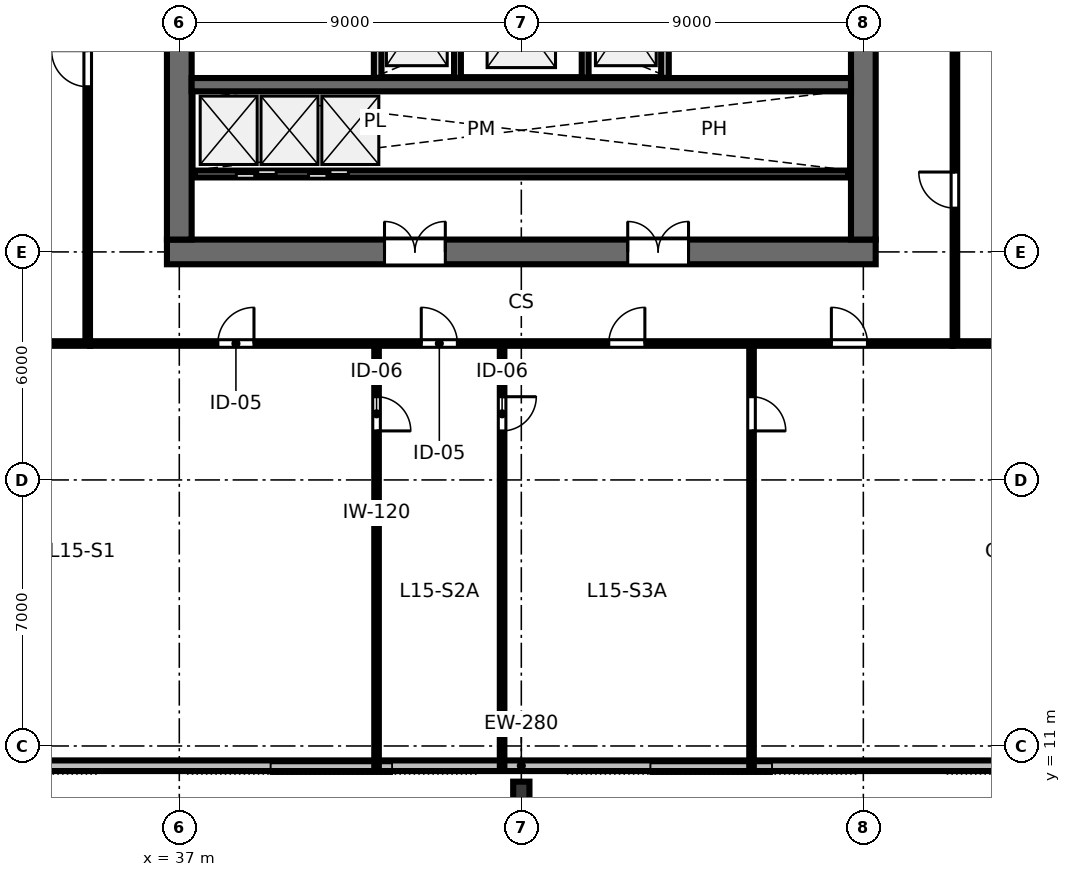
"""IFC4 building model, lengths in metres.
Left out: names, types, materials, properties, quantities, classifications, styles, units other than length and angle.
Written with IfcOpenShell. Run it as: python <this file> out.ifc"""

import sys

from ifc_helpers import new_model, si_unit, direction, frame, frame_2d, origin, origin_2d, place, context, subcontext, project, spatial, rectangle, i_section, extrude, element, fill, save


model = new_model("IFC4")
c1 = context("Model", 3, precision=1e-05, world=origin(), true_north=direction((0.0, 1.0)))
c2 = subcontext(c1, "Body", "Model", "MODEL_VIEW")
j1 = project(units=[si_unit("LENGTHUNIT", "METRE"), si_unit("PLANEANGLEUNIT", "RADIAN")], contexts=[c1])
p1 = place(None, origin())
s1 = spatial("IfcSite", under=j1, at=p1, CompositionType="ELEMENT")
p2 = place(p1, origin())
s2 = spatial("IfcBuilding", under=s1, at=p2, CompositionType="ELEMENT")
p3 = place(p2, frame((0.0, 0.0, 60.4)))
s3 = spatial("IfcBuildingStorey", under=s2, at=p3, CompositionType="ELEMENT", Elevation=60.4)
p4 = place(p3, frame((36.675, 24.0, 0.0), z_axis=(0.0, 0.0, 1.0), x_axis=(1.0, 0.0, 0.0)))
e1 = element("IfcWall", 1, at=p4, inside=s3, PredefinedType="SHEAR", context=c2, shape_type="SweptSolid", body=[
    extrude(rectangle(XDim=18.65, YDim=0.65, at=frame_2d((9.325, 0.0))), origin(), (0.0, 0.0, 1.0), 3.36),
])
p5 = place(p4, frame((5.725, 0.0, 0.0)))
e2 = element("IfcOpeningElement", 2, at=p5, cuts=e1, PredefinedType="OPENING", context=c2, shape_type="SweptSolid", body=[
    extrude(rectangle(XDim=1.6, YDim=2.15, at=frame_2d((0.8, 1.075))), frame((0.0, 0.335, 0.0), z_axis=(0.0, -1.0, 0.0), x_axis=(1.0, 0.0, 0.0)), (0.0, 0.0, 1.0), 0.67),
])
p6 = place(p4, frame((12.125, 0.0, 0.0)))
e3 = element("IfcOpeningElement", 3, at=p6, cuts=e1, PredefinedType="OPENING", context=c2, shape_type="SweptSolid", body=[
    extrude(rectangle(XDim=1.6, YDim=2.15, at=frame_2d((0.8, 1.075))), frame((0.0, 0.335, 0.0), z_axis=(0.0, -1.0, 0.0), x_axis=(1.0, 0.0, 0.0)), (0.0, 0.0, 1.0), 0.67),
])
p7 = place(p3, frame((37.0, 24.325, 0.0), z_axis=(0.0, 0.0, 1.0), x_axis=(0.0, 1.0, 0.0)))
e4 = element("IfcWall", 4, at=p7, inside=s3, PredefinedType="SHEAR", context=c2, shape_type="SweptSolid", body=[
    extrude(rectangle(XDim=15.35, YDim=0.65, at=frame_2d((7.675, 0.0))), origin(), (0.0, 0.0, 1.0), 3.36),
])
p8 = place(p7, frame((5.2, 0.0, 0.0)))
e5 = element("IfcOpeningElement", 5, at=p8, cuts=e4, PredefinedType="OPENING", context=c2, shape_type="SweptSolid", body=[
    extrude(rectangle(XDim=1.15, YDim=2.15, at=frame_2d((0.575, 1.075))), frame((0.0, 0.335, 0.0), z_axis=(0.0, -1.0, 0.0), x_axis=(1.0, 0.0, 0.0)), (0.0, 0.0, 1.0), 0.67),
])
p9 = place(p3, frame((55.0, 24.325, 0.0), z_axis=(0.0, 0.0, 1.0), x_axis=(0.0, 1.0, 0.0)))
e6 = element("IfcWall", 6, at=p9, inside=s3, PredefinedType="SHEAR", context=c2, shape_type="SweptSolid", body=[
    extrude(rectangle(XDim=15.35, YDim=0.65, at=frame_2d((7.675, 0.0))), origin(), (0.0, 0.0, 1.0), 3.36),
])
p10 = place(p9, frame((5.2, 0.0, 0.0)))
e7 = element("IfcOpeningElement", 7, at=p10, cuts=e6, PredefinedType="OPENING", context=c2, shape_type="SweptSolid", body=[
    extrude(rectangle(XDim=1.15, YDim=2.15, at=frame_2d((0.575, 1.075))), frame((0.0, 0.335, 0.0), z_axis=(0.0, -1.0, 0.0), x_axis=(1.0, 0.0, 0.0)), (0.0, 0.0, 1.0), 0.67),
])
p11 = place(p3, frame((37.325, 28.4, 0.0), z_axis=(0.0, 0.0, 1.0), x_axis=(1.0, 0.0, 0.0)))
e8 = element("IfcWall", 8, at=p11, inside=s3, PredefinedType="SHEAR", context=c2, shape_type="SweptSolid", body=[
    extrude(rectangle(XDim=17.35, YDim=0.35, at=frame_2d((8.675, 0.0))), origin(), (0.0, 0.0, 1.0), 3.36),
])
p12 = place(p3, frame((46.0, 9.82, 0.0), z_axis=(0.0, 0.0, 1.0), x_axis=(1.0, 0.0, 0.0)))
e9 = element("IfcColumn", 9, at=p12, inside=s3, PredefinedType="COLUMN", context=c2, shape_type="SweptSolid", body=[
    extrude(i_section(OverallWidth=0.428, OverallDepth=0.483, WebThickness=0.051, FlangeThickness=0.082, FilletRadius=0.025, at=origin_2d()), origin(), (0.0, 0.0, 1.0), 3.358),
])
p13 = place(p3, frame((25.11, 10.48, 0.0), z_axis=(0.0, 0.0, 1.0), x_axis=(1.0, 0.0, 0.0)))
e10 = element("IfcWall", 10, at=p13, inside=s3, PredefinedType="STANDARD", context=c2, shape_type="SweptSolid", body=[
    extrude(rectangle(XDim=41.78, YDim=0.28, at=frame_2d((20.89, 0.0))), origin(), (0.0, 0.0, 1.0), 3.36),
])
p14 = place(p3, frame((42.22, 28.58, 0.0), z_axis=(0.0, 0.0, 1.0), x_axis=(0.0, 1.0, 0.0)))
e11 = element("IfcWall", 11, at=p14, inside=s3, PredefinedType="PARTITIONING", context=c2, shape_type="SweptSolid", body=[
    extrude(rectangle(XDim=3.04, YDim=0.2, at=frame_2d((1.52, 0.0))), origin(), (0.0, 0.0, 1.0), 3.36),
])
p15 = place(p14, frame((0.95, 0.0, 0.0)))
e12 = element("IfcOpeningElement", 12, at=p15, cuts=e11, PredefinedType="OPENING", context=c2, shape_type="SweptSolid", body=[
    extrude(rectangle(XDim=1.05, YDim=2.15, at=frame_2d((0.525, 1.075))), frame((0.0, 0.11, 0.0), z_axis=(0.0, -1.0, 0.0), x_axis=(1.0, 0.0, 0.0)), (0.0, 0.0, 1.0), 0.22),
])
p16 = place(p3, frame((49.78, 28.58, 0.0), z_axis=(0.0, 0.0, 1.0), x_axis=(0.0, 1.0, 0.0)))
e13 = element("IfcWall", 13, at=p16, inside=s3, PredefinedType="PARTITIONING", context=c2, shape_type="SweptSolid", body=[
    extrude(rectangle(XDim=3.04, YDim=0.2, at=frame_2d((1.52, 0.0))), origin(), (0.0, 0.0, 1.0), 3.36),
])
p17 = place(p16, frame((0.95, 0.0, 0.0)))
e14 = element("IfcOpeningElement", 14, at=p17, cuts=e13, PredefinedType="OPENING", context=c2, shape_type="SweptSolid", body=[
    extrude(rectangle(XDim=1.05, YDim=2.15, at=frame_2d((0.525, 1.075))), frame((0.0, 0.11, 0.0), z_axis=(0.0, -1.0, 0.0), x_axis=(1.0, 0.0, 0.0)), (0.0, 0.0, 1.0), 0.22),
])
for number, where, z_axis, x_axis in (
    (15, (44.32, 28.58, 0.0), (0.0, 0.0, 1.0), (0.0, 1.0, 0.0)),
    (16, (47.68, 28.58, 0.0), (0.0, 0.0, 1.0), (0.0, 1.0, 0.0)),
):
    element("IfcWall", number, at=place(p3, frame(where, z_axis=z_axis, x_axis=x_axis)), inside=s3, PredefinedType="PARTITIONING", context=c2, shape_type="SweptSolid", body=[
        extrude(rectangle(XDim=3.04, YDim=0.18, at=frame_2d((1.52, 0.0))), origin(), (0.0, 0.0, 1.0), 3.36),
    ])
p18 = place(p3, frame((37.4, 26.05, 0.0), z_axis=(0.0, 0.0, 1.0), x_axis=(1.0, 0.0, 0.0)))
e17 = element("IfcWall", 17, at=p18, inside=s3, PredefinedType="PARTITIONING", context=c2, shape_type="SweptSolid", body=[
    extrude(rectangle(XDim=17.2, YDim=0.18, at=frame_2d((8.6, 0.0))), origin(), (0.0, 0.0, 1.0), 3.36),
])
p19 = place(p18, frame((1.1, 0.0, 0.0)))
e18 = element("IfcOpeningElement", 18, at=p19, cuts=e17, PredefinedType="OPENING", context=c2, shape_type="SweptSolid", body=[
    extrude(rectangle(XDim=1.05, YDim=2.15, at=frame_2d((0.525, 1.075))), frame((0.0, 0.1, 0.0), z_axis=(0.0, -1.0, 0.0), x_axis=(1.0, 0.0, 0.0)), (0.0, 0.0, 1.0), 0.2),
])
p20 = place(p18, frame((3.0, 0.0, 0.0)))
e19 = element("IfcOpeningElement", 19, at=p20, cuts=e17, PredefinedType="OPENING", context=c2, shape_type="SweptSolid", body=[
    extrude(rectangle(XDim=1.05, YDim=2.15, at=frame_2d((0.525, 1.075))), frame((0.0, 0.1, 0.0), z_axis=(0.0, -1.0, 0.0), x_axis=(1.0, 0.0, 0.0)), (0.0, 0.0, 1.0), 0.2),
])
p21 = place(p3, frame((42.191, 21.59, 0.0), z_axis=(0.0, 0.0, 1.0), x_axis=(0.0, -1.0, 0.0)))
e20 = element("IfcWall", 20, at=p21, inside=s3, PredefinedType="PARTITIONING", context=c2, shape_type="SweptSolid", body=[
    extrude(rectangle(XDim=11.11, YDim=0.12, at=frame_2d((5.555, 0.0))), origin(), (0.0, 0.0, 1.0), 2.64),
])
p22 = place(p21, frame((1.4, 0.0, 0.0)))
e21 = element("IfcOpeningElement", 21, at=p22, cuts=e20, PredefinedType="OPENING", context=c2, shape_type="SweptSolid", body=[
    extrude(rectangle(XDim=0.9, YDim=2.15, at=frame_2d((0.45, 1.075))), frame((0.0, 0.07, 0.0), z_axis=(0.0, -1.0, 0.0), x_axis=(1.0, 0.0, 0.0)), (0.0, 0.0, 1.0), 0.14),
])
p23 = place(p3, frame((45.494, 21.59, 0.0), z_axis=(0.0, 0.0, 1.0), x_axis=(0.0, -1.0, 0.0)))
e22 = element("IfcWall", 22, at=p23, inside=s3, PredefinedType="PARTITIONING", context=c2, shape_type="SweptSolid", body=[
    extrude(rectangle(XDim=11.11, YDim=0.12, at=frame_2d((5.555, 0.0))), origin(), (0.0, 0.0, 1.0), 2.64),
])
p24 = place(p23, frame((1.4, 0.0, 0.0)))
e23 = element("IfcOpeningElement", 23, at=p24, cuts=e22, PredefinedType="OPENING", context=c2, shape_type="SweptSolid", body=[
    extrude(rectangle(XDim=0.9, YDim=2.15, at=frame_2d((0.45, 1.075))), frame((0.0, 0.07, 0.0), z_axis=(0.0, -1.0, 0.0), x_axis=(1.0, 0.0, 0.0)), (0.0, 0.0, 1.0), 0.14),
])
p25 = place(p3, frame((52.058, 21.59, 0.0), z_axis=(0.0, 0.0, 1.0), x_axis=(0.0, -1.0, 0.0)))
e24 = element("IfcWall", 24, at=p25, inside=s3, PredefinedType="PARTITIONING", context=c2, shape_type="SweptSolid", body=[
    extrude(rectangle(XDim=11.11, YDim=0.12, at=frame_2d((5.555, 0.0))), origin(), (0.0, 0.0, 1.0), 2.64),
])
p26 = place(p25, frame((1.4, 0.0, 0.0)))
e25 = element("IfcOpeningElement", 25, at=p26, cuts=e24, PredefinedType="OPENING", context=c2, shape_type="SweptSolid", body=[
    extrude(rectangle(XDim=0.9, YDim=2.15, at=frame_2d((0.45, 1.075))), frame((0.0, 0.07, 0.0), z_axis=(0.0, -1.0, 0.0), x_axis=(1.0, 0.0, 0.0)), (0.0, 0.0, 1.0), 0.14),
])
p27 = place(p3, frame((34.65, 21.59, 0.0), z_axis=(0.0, 0.0, 1.0), x_axis=(1.0, 0.0, 0.0)))
e26 = element("IfcWall", 26, at=p27, inside=s3, PredefinedType="PARTITIONING", context=c2, shape_type="SweptSolid", body=[
    extrude(rectangle(XDim=22.7, YDim=0.12, at=frame_2d((11.35, 0.0))), origin(), (0.0, 0.0, 1.0), 2.64),
])
p28 = place(p27, frame((3.365, 0.0, 0.0)))
e27 = element("IfcOpeningElement", 27, at=p28, cuts=e26, PredefinedType="OPENING", context=c2, shape_type="SweptSolid", body=[
    extrude(rectangle(XDim=0.95, YDim=2.15, at=frame_2d((0.475, 1.075))), frame((0.0, 0.07, 0.0), z_axis=(0.0, -1.0, 0.0), x_axis=(1.0, 0.0, 0.0)), (0.0, 0.0, 1.0), 0.14),
])
p29 = place(p27, frame((8.718, 0.0, 0.0)))
e28 = element("IfcOpeningElement", 28, at=p29, cuts=e26, PredefinedType="OPENING", context=c2, shape_type="SweptSolid", body=[
    extrude(rectangle(XDim=0.95, YDim=2.15, at=frame_2d((0.475, 1.075))), frame((0.0, 0.07, 0.0), z_axis=(0.0, -1.0, 0.0), x_axis=(1.0, 0.0, 0.0)), (0.0, 0.0, 1.0), 0.14),
])
p30 = place(p27, frame((13.651, 0.0, 0.0)))
e29 = element("IfcOpeningElement", 29, at=p30, cuts=e26, PredefinedType="OPENING", context=c2, shape_type="SweptSolid", body=[
    extrude(rectangle(XDim=0.95, YDim=2.15, at=frame_2d((0.475, 1.075))), frame((0.0, 0.07, 0.0), z_axis=(0.0, -1.0, 0.0), x_axis=(1.0, 0.0, 0.0)), (0.0, 0.0, 1.0), 0.14),
])
p31 = place(p27, frame((19.509, 0.0, 0.0)))
e30 = element("IfcOpeningElement", 30, at=p31, cuts=e26, PredefinedType="OPENING", context=c2, shape_type="SweptSolid", body=[
    extrude(rectangle(XDim=0.95, YDim=2.15, at=frame_2d((0.475, 1.075))), frame((0.0, 0.07, 0.0), z_axis=(0.0, -1.0, 0.0), x_axis=(1.0, 0.0, 0.0)), (0.0, 0.0, 1.0), 0.14),
])
p32 = place(p3, frame((34.59, 21.65, 0.0), z_axis=(0.0, 0.0, 1.0), x_axis=(0.0, 1.0, 0.0)))
e31 = element("IfcWall", 31, at=p32, inside=s3, PredefinedType="PARTITIONING", context=c2, shape_type="SweptSolid", body=[
    extrude(rectangle(XDim=20.7, YDim=0.12, at=frame_2d((10.35, 0.0))), origin(), (0.0, 0.0, 1.0), 2.64),
])
p33 = place(p32, frame((6.696, 0.0, 0.0)))
e32 = element("IfcOpeningElement", 32, at=p33, cuts=e31, PredefinedType="OPENING", context=c2, shape_type="SweptSolid", body=[
    extrude(rectangle(XDim=0.95, YDim=2.15, at=frame_2d((0.475, 1.075))), frame((0.0, 0.07, 0.0), z_axis=(0.0, -1.0, 0.0), x_axis=(1.0, 0.0, 0.0)), (0.0, 0.0, 1.0), 0.14),
])
p34 = place(p32, frame((16.846, 0.0, 0.0)))
e33 = element("IfcOpeningElement", 33, at=p34, cuts=e31, PredefinedType="OPENING", context=c2, shape_type="SweptSolid", body=[
    extrude(rectangle(XDim=0.95, YDim=2.15, at=frame_2d((0.475, 1.075))), frame((0.0, 0.07, 0.0), z_axis=(0.0, -1.0, 0.0), x_axis=(1.0, 0.0, 0.0)), (0.0, 0.0, 1.0), 0.14),
])
p35 = place(p3, frame((57.41, 21.65, 0.0), z_axis=(0.0, 0.0, 1.0), x_axis=(0.0, 1.0, 0.0)))
e34 = element("IfcWall", 34, at=p35, inside=s3, PredefinedType="PARTITIONING", context=c2, shape_type="SweptSolid", body=[
    extrude(rectangle(XDim=20.7, YDim=0.12, at=frame_2d((10.35, 0.0))), origin(), (0.0, 0.0, 1.0), 2.64),
])
p36 = place(p35, frame((3.502, 0.0, 0.0)))
e35 = element("IfcOpeningElement", 35, at=p36, cuts=e34, PredefinedType="OPENING", context=c2, shape_type="SweptSolid", body=[
    extrude(rectangle(XDim=0.95, YDim=2.15, at=frame_2d((0.475, 1.075))), frame((0.0, 0.07, 0.0), z_axis=(0.0, -1.0, 0.0), x_axis=(1.0, 0.0, 0.0)), (0.0, 0.0, 1.0), 0.14),
])
p37 = place(p35, frame((13.652, 0.0, 0.0)))
e36 = element("IfcOpeningElement", 36, at=p37, cuts=e34, PredefinedType="OPENING", context=c2, shape_type="SweptSolid", body=[
    extrude(rectangle(XDim=0.95, YDim=2.15, at=frame_2d((0.475, 1.075))), frame((0.0, 0.07, 0.0), z_axis=(0.0, -1.0, 0.0), x_axis=(1.0, 0.0, 0.0)), (0.0, 0.0, 1.0), 0.14),
])
for number, where, z_axis, x_axis in (
    (37, (34.65, 21.59, 0.0), (0.0, 0.0, 1.0), (-1.0, 0.0, 0.0)),
    (38, (57.35, 21.59, 0.0), (0.0, 0.0, 1.0), (1.0, 0.0, 0.0)),
):
    element("IfcWall", number, at=place(p3, frame(where, z_axis=z_axis, x_axis=x_axis)), inside=s3, PredefinedType="PARTITIONING", context=c2, shape_type="SweptSolid", body=[
        extrude(rectangle(XDim=13.12, YDim=0.12, at=frame_2d((6.56, 0.0))), origin(), (0.0, 0.0, 1.0), 2.64),
    ])
p38 = place(p5, origin())
e39 = element("IfcDoor", 39, at=p38, inside=s3, OperationType="DOUBLE_DOOR_SINGLE_SWING", PredefinedType="DOOR", context=c2, shape_type="SweptSolid", body=[
    extrude(rectangle(XDim=1.6, YDim=2.15, at=frame_2d((0.8, 1.075))), frame((0.0, 0.025, 0.0), z_axis=(0.0, -1.0, 0.0), x_axis=(1.0, 0.0, 0.0)), (0.0, 0.0, 1.0), 0.05),
])
fill(e2, e39)
p39 = place(p6, origin())
e40 = element("IfcDoor", 40, at=p39, inside=s3, OperationType="DOUBLE_DOOR_SINGLE_SWING", PredefinedType="DOOR", context=c2, shape_type="SweptSolid", body=[
    extrude(rectangle(XDim=1.6, YDim=2.15, at=frame_2d((0.8, 1.075))), frame((0.0, 0.025, 0.0), z_axis=(0.0, -1.0, 0.0), x_axis=(1.0, 0.0, 0.0)), (0.0, 0.0, 1.0), 0.05),
])
fill(e3, e40)
p40 = place(p19, origin())
e41 = element("IfcDoor", 41, at=p40, inside=s3, OperationType="SLIDING_TO_LEFT", PredefinedType="DOOR", context=c2, shape_type="SweptSolid", body=[
    extrude(rectangle(XDim=1.05, YDim=2.15, at=frame_2d((0.525, 1.075))), frame((0.0, 0.025, 0.0), z_axis=(0.0, -1.0, 0.0), x_axis=(1.0, 0.0, 0.0)), (0.0, 0.0, 1.0), 0.05),
])
fill(e18, e41)
p41 = place(p20, origin())
e42 = element("IfcDoor", 42, at=p41, inside=s3, OperationType="SLIDING_TO_RIGHT", PredefinedType="DOOR", context=c2, shape_type="SweptSolid", body=[
    extrude(rectangle(XDim=1.05, YDim=2.15, at=frame_2d((0.525, 1.075))), frame((0.0, 0.025, 0.0), z_axis=(0.0, -1.0, 0.0), x_axis=(1.0, 0.0, 0.0)), (0.0, 0.0, 1.0), 0.05),
])
fill(e19, e42)
p42 = place(p22, origin())
e43 = element("IfcDoor", 43, at=p42, inside=s3, OperationType="SINGLE_SWING_RIGHT", PredefinedType="DOOR", context=c2, shape_type="SweptSolid", body=[
    extrude(rectangle(XDim=0.9, YDim=2.15, at=frame_2d((0.45, 1.075))), frame((0.0, 0.025, 0.0), z_axis=(0.0, -1.0, 0.0), x_axis=(1.0, 0.0, 0.0)), (0.0, 0.0, 1.0), 0.05),
])
fill(e21, e43)
p43 = place(p24, origin())
e44 = element("IfcDoor", 44, at=p43, inside=s3, OperationType="SINGLE_SWING_LEFT", PredefinedType="DOOR", context=c2, shape_type="SweptSolid", body=[
    extrude(rectangle(XDim=0.9, YDim=2.15, at=frame_2d((0.45, 1.075))), frame((0.0, 0.025, 0.0), z_axis=(0.0, -1.0, 0.0), x_axis=(1.0, 0.0, 0.0)), (0.0, 0.0, 1.0), 0.05),
])
fill(e23, e44)
p44 = place(p26, origin())
e45 = element("IfcDoor", 45, at=p44, inside=s3, OperationType="SINGLE_SWING_RIGHT", PredefinedType="DOOR", context=c2, shape_type="SweptSolid", body=[
    extrude(rectangle(XDim=0.9, YDim=2.15, at=frame_2d((0.45, 1.075))), frame((0.0, 0.025, 0.0), z_axis=(0.0, -1.0, 0.0), x_axis=(1.0, 0.0, 0.0)), (0.0, 0.0, 1.0), 0.05),
])
fill(e25, e45)
p45 = place(p28, origin())
e46 = element("IfcDoor", 46, at=p45, inside=s3, OperationType="SINGLE_SWING_RIGHT", PredefinedType="DOOR", context=c2, shape_type="SweptSolid", body=[
    extrude(rectangle(XDim=0.95, YDim=2.15, at=frame_2d((0.475, 1.075))), frame((0.0, 0.025, 0.0), z_axis=(0.0, -1.0, 0.0), x_axis=(1.0, 0.0, 0.0)), (0.0, 0.0, 1.0), 0.05),
])
fill(e27, e46)
p46 = place(p29, origin())
e47 = element("IfcDoor", 47, at=p46, inside=s3, OperationType="SINGLE_SWING_LEFT", PredefinedType="DOOR", context=c2, shape_type="SweptSolid", body=[
    extrude(rectangle(XDim=0.95, YDim=2.15, at=frame_2d((0.475, 1.075))), frame((0.0, 0.025, 0.0), z_axis=(0.0, -1.0, 0.0), x_axis=(1.0, 0.0, 0.0)), (0.0, 0.0, 1.0), 0.05),
])
fill(e28, e47)
p47 = place(p30, origin())
e48 = element("IfcDoor", 48, at=p47, inside=s3, OperationType="SINGLE_SWING_RIGHT", PredefinedType="DOOR", context=c2, shape_type="SweptSolid", body=[
    extrude(rectangle(XDim=0.95, YDim=2.15, at=frame_2d((0.475, 1.075))), frame((0.0, 0.025, 0.0), z_axis=(0.0, -1.0, 0.0), x_axis=(1.0, 0.0, 0.0)), (0.0, 0.0, 1.0), 0.05),
])
fill(e29, e48)
p48 = place(p31, origin())
e49 = element("IfcDoor", 49, at=p48, inside=s3, OperationType="SINGLE_SWING_LEFT", PredefinedType="DOOR", context=c2, shape_type="SweptSolid", body=[
    extrude(rectangle(XDim=0.95, YDim=2.15, at=frame_2d((0.475, 1.075))), frame((0.0, 0.025, 0.0), z_axis=(0.0, -1.0, 0.0), x_axis=(1.0, 0.0, 0.0)), (0.0, 0.0, 1.0), 0.05),
])
fill(e30, e49)
p49 = place(p33, origin())
e50 = element("IfcDoor", 50, at=p49, inside=s3, OperationType="SINGLE_SWING_RIGHT", PredefinedType="DOOR", context=c2, shape_type="SweptSolid", body=[
    extrude(rectangle(XDim=0.95, YDim=2.15, at=frame_2d((0.475, 1.075))), frame((0.0, 0.025, 0.0), z_axis=(0.0, -1.0, 0.0), x_axis=(1.0, 0.0, 0.0)), (0.0, 0.0, 1.0), 0.05),
])
fill(e32, e50)
p50 = place(p36, origin())
e51 = element("IfcDoor", 51, at=p50, inside=s3, OperationType="SINGLE_SWING_RIGHT", PredefinedType="DOOR", context=c2, shape_type="SweptSolid", body=[
    extrude(rectangle(XDim=0.95, YDim=2.15, at=frame_2d((0.475, 1.075))), frame((0.0, 0.025, 0.0), z_axis=(0.0, -1.0, 0.0), x_axis=(1.0, 0.0, 0.0)), (0.0, 0.0, 1.0), 0.05),
])
fill(e35, e51)
save(model, sys.argv[1])
